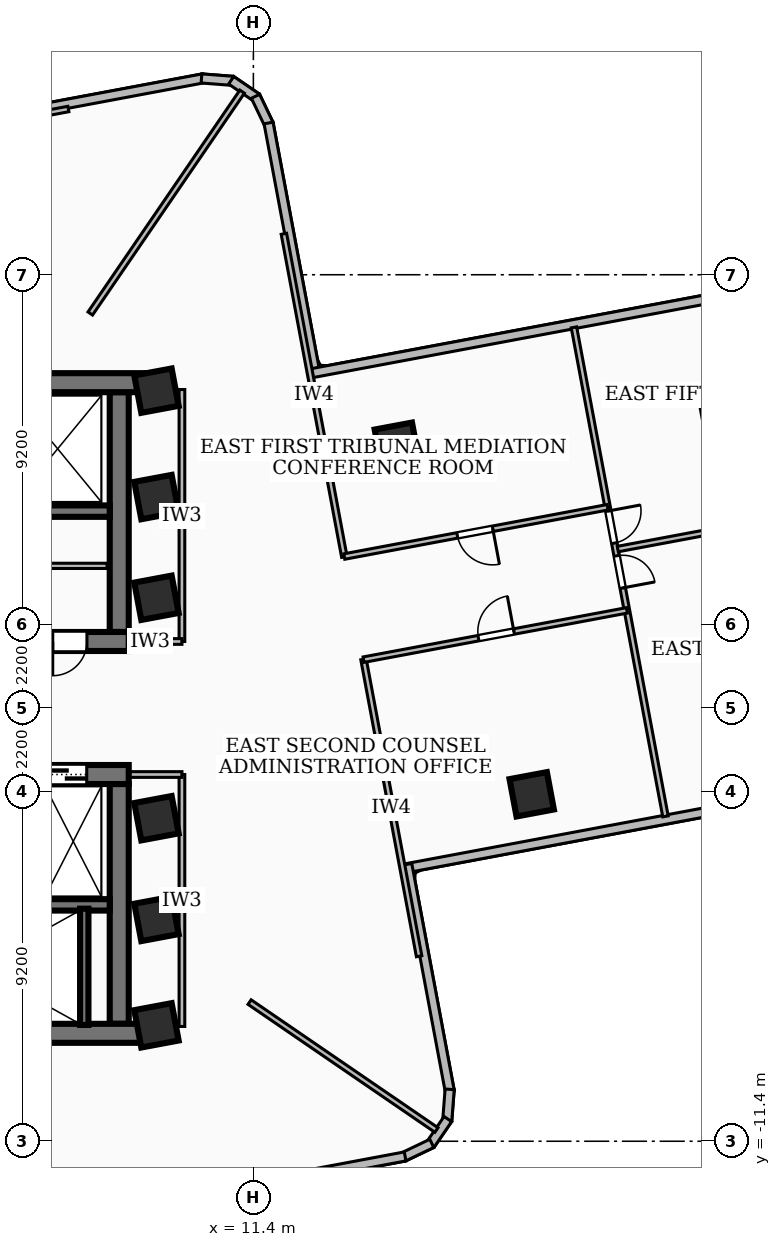
"""IFC4 building model, lengths in metres.
Left out: names, types, materials, properties, quantities, classifications, styles, units other than length and angle.
Written with IfcOpenShell. Run it as: python <this file> out.ifc"""

import sys

from ifc_helpers import new_model, si_unit, direction, frame, frame_2d, origin, origin_2d, place, context, subcontext, project, spatial, rectangle, extrude, element, fill, save


model = new_model("IFC4")
c1 = context("Model", 3, precision=1e-05, world=origin(), true_north=direction((0.0, 1.0)))
c2 = subcontext(c1, "Body", "Model", "MODEL_VIEW")
j1 = project(units=[si_unit("LENGTHUNIT", "METRE"), si_unit("PLANEANGLEUNIT", "RADIAN")], contexts=[c1])
p1 = place(None, origin())
s1 = spatial("IfcSite", under=j1, at=p1, CompositionType="ELEMENT")
p2 = place(p1, origin())
s2 = spatial("IfcBuilding", under=s1, at=p2, CompositionType="ELEMENT")
p3 = place(p2, frame((0.0, 0.0, 103.68)))
s3 = spatial("IfcBuildingStorey", under=s2, at=p3, CompositionType="ELEMENT", Elevation=103.68)
p4 = place(p3, frame((-8.78, 8.56, 0.0), z_axis=(0.0, 0.0, 1.0), x_axis=(1.0, 0.0, 0.0)))
e1 = element("IfcWall", 1, at=p4, inside=s3, PredefinedType="SHEAR", context=c2, shape_type="SweptSolid", body=[
    extrude(rectangle(XDim=17.56, YDim=0.5, at=frame_2d((8.78, 0.0))), origin(), (0.0, 0.0, 1.0), 3.2),
])
p5 = place(p3, frame((8.12, 1.75, 0.0), z_axis=(0.0, 0.0, 1.0), x_axis=(-1.0, 0.0, 0.0)))
e2 = element("IfcWall", 2, at=p5, inside=s3, PredefinedType="SHEAR", context=c2, shape_type="SweptSolid", body=[
    extrude(rectangle(XDim=16.24, YDim=0.5, at=frame_2d((8.12, 0.0))), origin(), (0.0, 0.0, 1.0), 3.2),
])
p6 = place(p5, frame((7.45, 0.0, 0.0)))
e3 = element("IfcOpeningElement", 3, at=p6, cuts=e2, PredefinedType="OPENING", context=c2, shape_type="SweptSolid", body=[
    extrude(rectangle(XDim=1.0, YDim=2.1, at=frame_2d((0.5, 1.05))), frame((0.0, 0.26, 0.0), z_axis=(0.0, -1.0, 0.0), x_axis=(1.0, 0.0, 0.0)), (0.0, 0.0, 1.0), 0.52),
])
p7 = place(p5, frame((3.4, 0.0, 0.0)))
e4 = element("IfcOpeningElement", 4, at=p7, cuts=e2, PredefinedType="OPENING", context=c2, shape_type="SweptSolid", body=[
    extrude(rectangle(XDim=0.9, YDim=2.06, at=frame_2d((0.45, 1.03))), frame((0.0, 0.26, 0.0), z_axis=(0.0, -1.0, 0.0), x_axis=(1.0, 0.0, 0.0)), (0.0, 0.0, 1.0), 0.52),
])
p8 = place(p5, frame((1.1, 0.0, 0.0)))
e5 = element("IfcOpeningElement", 5, at=p8, cuts=e2, PredefinedType="OPENING", context=c2, shape_type="SweptSolid", body=[
    extrude(rectangle(XDim=0.9, YDim=2.06, at=frame_2d((0.45, 1.03))), frame((0.0, 0.26, 0.0), z_axis=(0.0, -1.0, 0.0), x_axis=(1.0, 0.0, 0.0)), (0.0, 0.0, 1.0), 0.52),
])
p9 = place(p3, frame((7.87, 8.31, 0.0), z_axis=(0.0, 0.0, 1.0), x_axis=(0.0, -1.0, 0.0)))
e6 = element("IfcWall", 6, at=p9, inside=s3, PredefinedType="SHEAR", context=c2, shape_type="SweptSolid", body=[
    extrude(rectangle(XDim=6.31, YDim=0.5, at=frame_2d((3.155, 0.0))), origin(), (0.0, 0.0, 1.0), 3.2),
])
p10 = place(p3, frame((7.62, 5.18, 0.0), z_axis=(0.0, 0.0, 1.0), x_axis=(-1.0, 0.0, 0.0)))
e7 = element("IfcWall", 7, at=p10, inside=s3, PredefinedType="SOLIDWALL", context=c2, shape_type="SweptSolid", body=[
    extrude(rectangle(XDim=15.24, YDim=0.3, at=frame_2d((7.62, 0.0))), origin(), (0.0, 0.0, 1.0), 3.2),
])
p11 = place(p10, frame((5.77, 0.0, 0.0)))
e8 = element("IfcOpeningElement", 8, at=p11, cuts=e7, PredefinedType="OPENING", context=c2, shape_type="SweptSolid", body=[
    extrude(rectangle(XDim=1.1, YDim=2.15, at=frame_2d((0.55, 1.075))), frame((0.0, 0.16, 0.0), z_axis=(0.0, -1.0, 0.0), x_axis=(1.0, 0.0, 0.0)), (0.0, 0.0, 1.0), 0.32),
])
p12 = place(p10, frame((2.97, 0.0, 0.0)))
e9 = element("IfcOpeningElement", 9, at=p12, cuts=e7, PredefinedType="OPENING", context=c2, shape_type="SweptSolid", body=[
    extrude(rectangle(XDim=1.1, YDim=2.15, at=frame_2d((0.55, 1.075))), frame((0.0, 0.16, 0.0), z_axis=(0.0, -1.0, 0.0), x_axis=(1.0, 0.0, 0.0)), (0.0, 0.0, 1.0), 0.32),
])
p13 = place(p10, frame((7.97, 0.0, 0.0)))
e10 = element("IfcOpeningElement", 10, at=p13, cuts=e7, PredefinedType="OPENING", context=c2, shape_type="SweptSolid", body=[
    extrude(rectangle(XDim=1.0, YDim=2.1, at=frame_2d((0.5, 1.05))), frame((0.0, 0.16, 0.0), z_axis=(0.0, -1.0, 0.0), x_axis=(1.0, 0.0, 0.0)), (0.0, 0.0, 1.0), 0.32),
])
p14 = place(p3, frame((8.78, -8.56, 0.0), z_axis=(0.0, 0.0, 1.0), x_axis=(-1.0, 0.0, 0.0)))
e11 = element("IfcWall", 11, at=p14, inside=s3, PredefinedType="SHEAR", context=c2, shape_type="SweptSolid", body=[
    extrude(rectangle(XDim=17.56, YDim=0.5, at=frame_2d((8.78, 0.0))), origin(), (0.0, 0.0, 1.0), 3.2),
])
p15 = place(p3, frame((-8.12, -1.75, 0.0), z_axis=(0.0, 0.0, 1.0), x_axis=(1.0, 0.0, 0.0)))
e12 = element("IfcWall", 12, at=p15, inside=s3, PredefinedType="SHEAR", context=c2, shape_type="SweptSolid", body=[
    extrude(rectangle(XDim=16.24, YDim=0.5, at=frame_2d((8.12, 0.0))), origin(), (0.0, 0.0, 1.0), 3.2),
])
p16 = place(p15, frame((7.45, 0.0, 0.0)))
e13 = element("IfcOpeningElement", 13, at=p16, cuts=e12, PredefinedType="OPENING", context=c2, shape_type="SweptSolid", body=[
    extrude(rectangle(XDim=1.0, YDim=2.1, at=frame_2d((0.5, 1.05))), frame((0.0, 0.26, 0.0), z_axis=(0.0, -1.0, 0.0), x_axis=(1.0, 0.0, 0.0)), (0.0, 0.0, 1.0), 0.52),
])
p17 = place(p15, frame((10.965, 0.0, 0.0)))
e14 = element("IfcOpeningElement", 14, at=p17, cuts=e12, PredefinedType="OPENING", context=c2, shape_type="SweptSolid", body=[
    extrude(rectangle(XDim=1.05, YDim=2.15, at=frame_2d((0.525, 1.075))), frame((0.0, 0.26, 0.0), z_axis=(0.0, -1.0, 0.0), x_axis=(1.0, 0.0, 0.0)), (0.0, 0.0, 1.0), 0.52),
])
p18 = place(p15, frame((12.525, 0.0, 0.0)))
e15 = element("IfcOpeningElement", 15, at=p18, cuts=e12, PredefinedType="OPENING", context=c2, shape_type="SweptSolid", body=[
    extrude(rectangle(XDim=1.05, YDim=2.15, at=frame_2d((0.525, 1.075))), frame((0.0, 0.26, 0.0), z_axis=(0.0, -1.0, 0.0), x_axis=(1.0, 0.0, 0.0)), (0.0, 0.0, 1.0), 0.52),
])
p19 = place(p15, frame((14.085, 0.0, 0.0)))
e16 = element("IfcOpeningElement", 16, at=p19, cuts=e12, PredefinedType="OPENING", context=c2, shape_type="SweptSolid", body=[
    extrude(rectangle(XDim=1.05, YDim=2.15, at=frame_2d((0.525, 1.075))), frame((0.0, 0.26, 0.0), z_axis=(0.0, -1.0, 0.0), x_axis=(1.0, 0.0, 0.0)), (0.0, 0.0, 1.0), 0.52),
])
p20 = place(p3, frame((7.87, -2.0, 0.0), z_axis=(0.0, 0.0, 1.0), x_axis=(0.0, -1.0, 0.0)))
e17 = element("IfcWall", 17, at=p20, inside=s3, PredefinedType="SHEAR", context=c2, shape_type="SweptSolid", body=[
    extrude(rectangle(XDim=6.31, YDim=0.5, at=frame_2d((3.155, 0.0))), origin(), (0.0, 0.0, 1.0), 3.2),
])
p21 = place(p3, frame((-7.62, -5.18, 0.0), z_axis=(0.0, 0.0, 1.0), x_axis=(1.0, 0.0, 0.0)))
e18 = element("IfcWall", 18, at=p21, inside=s3, PredefinedType="SOLIDWALL", context=c2, shape_type="SweptSolid", body=[
    extrude(rectangle(XDim=15.24, YDim=0.3, at=frame_2d((7.62, 0.0))), origin(), (0.0, 0.0, 1.0), 3.2),
])
p22 = place(p21, frame((5.77, 0.0, 0.0)))
e19 = element("IfcOpeningElement", 19, at=p22, cuts=e18, PredefinedType="OPENING", context=c2, shape_type="SweptSolid", body=[
    extrude(rectangle(XDim=1.1, YDim=2.15, at=frame_2d((0.55, 1.075))), frame((0.0, 0.16, 0.0), z_axis=(0.0, -1.0, 0.0), x_axis=(1.0, 0.0, 0.0)), (0.0, 0.0, 1.0), 0.32),
])
p23 = place(p21, frame((7.97, 0.0, 0.0)))
e20 = element("IfcOpeningElement", 20, at=p23, cuts=e18, PredefinedType="OPENING", context=c2, shape_type="SweptSolid", body=[
    extrude(rectangle(XDim=1.0, YDim=2.1, at=frame_2d((0.5, 1.05))), frame((0.0, 0.16, 0.0), z_axis=(0.0, -1.0, 0.0), x_axis=(1.0, 0.0, 0.0)), (0.0, 0.0, 1.0), 0.32),
])
p24 = place(p3, frame((6.95, -8.34, 0.0), z_axis=(0.0, 0.0, 1.0), x_axis=(0.0, 1.0, 0.0)))
e21 = element("IfcWall", 21, at=p24, inside=s3, PredefinedType="SOLIDWALL", context=c2, shape_type="SweptSolid", body=[
    extrude(rectangle(XDim=3.06, YDim=0.22, at=frame_2d((1.53, 0.0))), origin(), (0.0, 0.0, 1.0), 3.2),
])
for number, where, z_axis, x_axis in (
    (22, (8.85, -5.55, 0.0), (0.0, 0.0, 1.0), (0.983, 0.184, 0.0)),
    (23, (8.85, -2.9, 0.0), (0.0, 0.0, 1.0), (0.983, 0.184, 0.0)),
    (24, (8.85, 2.9, 0.0), (0.0, 0.0, 1.0), (0.983, 0.184, 0.0)),
    (25, (8.85, 5.55, 0.0), (0.0, 0.0, 1.0), (0.983, 0.184, 0.0)),
    (26, (8.85, -8.35, 0.0), (0.0, 0.0, 1.0), (0.983, 0.184, 0.0)),
    (27, (8.85, 8.35, 0.0), (0.0, 0.0, 1.0), (0.983, 0.184, 0.0)),
    (28, (18.724, -2.271, 0.0), (0.0, 0.0, 1.0), (0.983, 0.184, 0.0)),
    (29, (15.175, 6.927, 0.0), (0.0, 0.0, 1.0), (0.983, 0.184, 0.0)),
    (30, (23.715, 7.851, 0.0), (0.0, 0.0, 1.0), (0.983, 0.184, 0.0)),
):
    element("IfcColumn", number, at=place(p3, frame(where, z_axis=z_axis, x_axis=x_axis)), inside=s3, PredefinedType="COLUMN", context=c2, shape_type="SweptSolid", body=[
        extrude(rectangle(XDim=1.0, YDim=1.0, at=origin_2d()), origin(), (0.0, 0.0, 1.0), 3.6),
    ])
p25 = place(p3, frame((4.113, 15.45, 0.0), z_axis=(0.0, 0.0, 1.0), x_axis=(0.982913564854, 0.18406771587, 0.0)))
e31 = element("IfcWall", 31, at=p25, inside=s3, PredefinedType="SOLIDWALL", context=c2, shape_type="SweptSolid", body=[
    extrude(rectangle(XDim=6.075, YDim=0.24, at=frame_2d((3.037, 0.0))), origin(), (0.0, 0.0, 1.0), 2.346),
])
p26 = place(p3, frame((10.034, 16.565, 0.0), z_axis=(0.0, 0.0, 1.0), x_axis=(0.997030229365, -0.077011179273, 0.0)))
e32 = element("IfcWall", 32, at=p26, inside=s3, PredefinedType="SOLIDWALL", context=c2, shape_type="SweptSolid", body=[
    extrude(rectangle(XDim=0.831, YDim=0.24, at=frame_2d((0.415, 0.0))), origin(), (0.0, 0.0, 1.0), 3.2),
])
p27 = place(p3, frame((10.816, 16.517, 0.0), z_axis=(0.0, 0.0, 1.0), x_axis=(0.825814611055, -0.563941688624, 0.0)))
e33 = element("IfcWall", 33, at=p27, inside=s3, PredefinedType="SOLIDWALL", context=c2, shape_type="SweptSolid", body=[
    extrude(rectangle(XDim=0.814, YDim=0.24, at=frame_2d((0.407, 0.0))), origin(), (0.0, 0.0, 1.0), 3.2),
])
p28 = place(p3, frame((11.456, 16.095, 0.0), z_axis=(0.0, 0.0, 1.0), x_axis=(0.431642510533, -0.902044756706, 0.0)))
e34 = element("IfcWall", 34, at=p28, inside=s3, PredefinedType="SOLIDWALL", context=c2, shape_type="SweptSolid", body=[
    extrude(rectangle(XDim=0.832, YDim=0.24, at=frame_2d((0.416, 0.0))), origin(), (0.0, 0.0, 1.0), 3.2),
])
p29 = place(p3, frame((11.799, 15.393, 0.0), z_axis=(0.0, 0.0, 1.0), x_axis=(0.184184115697, -0.982891759821, 0.0)))
e35 = element("IfcWall", 35, at=p29, inside=s3, PredefinedType="SOLIDWALL", context=c2, shape_type="SweptSolid", body=[
    extrude(rectangle(XDim=6.776, YDim=0.24, at=frame_2d((3.388, 0.0))), origin(), (0.0, 0.0, 1.0), 3.2),
])
p30 = place(p3, frame((12.935, 8.809, 0.0), z_axis=(0.0, 0.0, 1.0), x_axis=(0.982922588066, 0.184019525782, 0.0)))
e36 = element("IfcWall", 36, at=p30, inside=s3, PredefinedType="SOLIDWALL", context=c2, shape_type="SweptSolid", body=[
    extrude(rectangle(XDim=16.275, YDim=0.24, at=frame_2d((8.137, 0.0))), origin(), (0.0, 0.0, 1.0), 3.2),
])
p31 = place(p30, frame((12.475, 0.0, 0.85)))
e37 = element("IfcOpeningElement", 37, at=p31, cuts=e36, PredefinedType="OPENING", context=c2, shape_type="SweptSolid", body=[
    extrude(rectangle(XDim=2.7, YDim=1.65, at=frame_2d((1.35, 0.825))), frame((0.0, 0.13, 0.0), z_axis=(0.0, -1.0, 0.0), x_axis=(1.0, 0.0, 0.0)), (0.0, 0.0, 1.0), 0.26),
])
p32 = place(p3, frame((31.371, -1.23, 0.0), z_axis=(0.0, 0.0, 1.0), x_axis=(-0.982920382654, -0.18403130539, 0.0)))
e38 = element("IfcWall", 38, at=p32, inside=s3, PredefinedType="SOLIDWALL", context=c2, shape_type="SweptSolid", body=[
    extrude(rectangle(XDim=16.275, YDim=0.24, at=frame_2d((8.138, 0.0))), origin(), (0.0, 0.0, 1.0), 3.2),
])
p33 = place(p32, frame((1.1, 0.0, 0.85)))
e39 = element("IfcOpeningElement", 39, at=p33, cuts=e38, PredefinedType="OPENING", context=c2, shape_type="SweptSolid", body=[
    extrude(rectangle(XDim=2.1, YDim=2.0, at=frame_2d((1.05, 1.0))), frame((0.0, 0.13, 0.0), z_axis=(0.0, -1.0, 0.0), x_axis=(1.0, 0.0, 0.0)), (0.0, 0.0, 1.0), 0.26),
])
p34 = place(p3, frame((15.45, -4.113, 0.0), z_axis=(0.0, 0.0, 1.0), x_axis=(0.18406771587, -0.982913564854, 0.0)))
e40 = element("IfcWall", 40, at=p34, inside=s3, PredefinedType="SOLIDWALL", context=c2, shape_type="SweptSolid", body=[
    extrude(rectangle(XDim=6.075, YDim=0.24, at=frame_2d((3.037, 0.0))), origin(), (0.0, 0.0, 1.0), 3.2),
])
p35 = place(p3, frame((16.565, -10.034, 0.0), z_axis=(0.0, 0.0, 1.0), x_axis=(-0.077011179273, -0.997030229365, 0.0)))
e41 = element("IfcWall", 41, at=p35, inside=s3, PredefinedType="SOLIDWALL", context=c2, shape_type="SweptSolid", body=[
    extrude(rectangle(XDim=0.831, YDim=0.24, at=frame_2d((0.415, 0.0))), origin(), (0.0, 0.0, 1.0), 3.2),
])
p36 = place(p3, frame((16.517, -10.816, 0.0), z_axis=(0.0, 0.0, 1.0), x_axis=(-0.563941688624, -0.825814611055, 0.0)))
e42 = element("IfcWall", 42, at=p36, inside=s3, PredefinedType="SOLIDWALL", context=c2, shape_type="SweptSolid", body=[
    extrude(rectangle(XDim=0.814, YDim=0.24, at=frame_2d((0.407, 0.0))), origin(), (0.0, 0.0, 1.0), 3.2),
])
p37 = place(p3, frame((16.095, -11.456, 0.0), z_axis=(0.0, 0.0, 1.0), x_axis=(-0.902044756706, -0.431642510533, 0.0)))
e43 = element("IfcWall", 43, at=p37, inside=s3, PredefinedType="SOLIDWALL", context=c2, shape_type="SweptSolid", body=[
    extrude(rectangle(XDim=0.832, YDim=0.24, at=frame_2d((0.416, 0.0))), origin(), (0.0, 0.0, 1.0), 3.2),
])
p38 = place(p3, frame((15.393, -11.799, 0.0), z_axis=(0.0, 0.0, 1.0), x_axis=(-0.982891759821, -0.184184115697, 0.0)))
e44 = element("IfcWall", 44, at=p38, inside=s3, PredefinedType="SOLIDWALL", context=c2, shape_type="SweptSolid", body=[
    extrude(rectangle(XDim=6.776, YDim=0.24, at=frame_2d((3.388, 0.0))), origin(), (0.0, 0.0, 1.0), 3.2),
])
p39 = place(p3, frame((2.9, 3.74, 0.0), z_axis=(0.0, 0.0, 1.0), x_axis=(1.0, 0.0, 0.0)))
e45 = element("IfcWall", 45, at=p39, inside=s3, PredefinedType="PARTITIONING", context=c2, shape_type="SweptSolid", body=[
    extrude(rectangle(XDim=4.65, YDim=0.138, at=frame_2d((2.325, 0.0))), origin(), (0.0, 0.0, 1.0), 3.2),
])
p40 = place(p3, frame((9.52, 1.75, 0.0), z_axis=(0.0, 0.0, 1.0), x_axis=(0.0, 1.0, 0.0)))
e46 = element("IfcWall", 46, at=p40, inside=s3, PredefinedType="PARTITIONING", context=c2, shape_type="SweptSolid", body=[
    extrude(rectangle(XDim=6.63, YDim=0.15, at=frame_2d((3.315, 0.0))), origin(), (0.0, 0.0, 1.0), 2.346),
])
p41 = place(p3, frame((7.85, 1.75, 0.0), z_axis=(0.0, 0.0, 1.0), x_axis=(1.0, 0.0, 0.0)))
e47 = element("IfcWall", 47, at=p41, inside=s3, PredefinedType="PARTITIONING", context=c2, shape_type="SweptSolid", body=[
    extrude(rectangle(XDim=1.67, YDim=0.15, at=frame_2d((0.835, 0.0))), origin(), (0.0, 0.0, 1.0), 2.265),
])
p42 = place(p3, frame((9.52, -8.38, 0.0), z_axis=(0.0, 0.0, 1.0), x_axis=(0.0, 1.0, 0.0)))
e48 = element("IfcWall", 48, at=p42, inside=s3, PredefinedType="PARTITIONING", context=c2, shape_type="SweptSolid", body=[
    extrude(rectangle(XDim=6.63, YDim=0.15, at=frame_2d((3.315, 0.0))), origin(), (0.0, 0.0, 1.0), 2.346),
])
p43 = place(p3, frame((7.85, -1.75, 0.0), z_axis=(0.0, 0.0, 1.0), x_axis=(1.0, 0.0, 0.0)))
e49 = element("IfcWall", 49, at=p43, inside=s3, PredefinedType="PARTITIONING", context=c2, shape_type="SweptSolid", body=[
    extrude(rectangle(XDim=1.67, YDim=0.15, at=frame_2d((0.835, 0.0))), origin(), (0.0, 0.0, 1.0), 2.265),
])
p44 = place(p3, frame((7.108, 10.38, 0.0), z_axis=(0.0, 0.0, 1.0), x_axis=(0.564900413187, 0.825159089619, 0.0)))
e50 = element("IfcWall", 50, at=p44, inside=s3, PredefinedType="PARTITIONING", context=c2, shape_type="SweptSolid", body=[
    extrude(rectangle(XDim=7.074, YDim=0.145, at=frame_2d((3.537, 0.0))), origin(), (0.0, 0.0, 1.0), 2.346),
])
p45 = place(p3, frame((11.3, -7.738, 0.0), z_axis=(0.0, 0.0, 1.0), x_axis=(0.825173577049, -0.564879250584, 0.0)))
e51 = element("IfcWall", 51, at=p45, inside=s3, PredefinedType="PARTITIONING", context=c2, shape_type="SweptSolid", body=[
    extrude(rectangle(XDim=5.959, YDim=0.145, at=frame_2d((2.979, 0.0))), origin(), (0.0, 0.0, 1.0), 3.2),
])
p46 = place(p3, frame((13.794, 3.975, 0.0), z_axis=(0.0, 0.0, 1.0), x_axis=(-0.183947683851, 0.982936035358, 0.0)))
e52 = element("IfcWall", 52, at=p46, inside=s3, PredefinedType="PARTITIONING", context=c2, shape_type="SweptSolid", body=[
    extrude(rectangle(XDim=8.65, YDim=0.145, at=frame_2d((4.325, 0.0))), origin(), (0.0, 0.0, 1.0), 2.346),
])
p47 = place(p3, frame((15.761, -6.532, 0.0), z_axis=(0.0, 0.0, 1.0), x_axis=(-0.184017811376, 0.98292290903, 0.0)))
e53 = element("IfcWall", 53, at=p47, inside=s3, PredefinedType="PARTITIONING", context=c2, shape_type="SweptSolid", body=[
    extrude(rectangle(XDim=7.95, YDim=0.145, at=frame_2d((3.975, 0.0))), origin(), (0.0, 0.0, 1.0), 2.346),
])
p48 = place(p3, frame((20.722, 5.282, 0.0), z_axis=(0.0, 0.0, 1.0), x_axis=(-0.982936027627, -0.183947725163, 0.0)))
e54 = element("IfcWall", 54, at=p48, inside=s3, PredefinedType="PARTITIONING", context=c2, shape_type="SweptSolid", body=[
    extrude(rectangle(XDim=7.05, YDim=0.145, at=frame_2d((3.525, 0.0))), origin(), (0.0, 0.0, 1.0), 3.2),
])
p49 = place(p48, frame((3.075, 0.0, 0.0)))
e55 = element("IfcOpeningElement", 55, at=p49, cuts=e54, PredefinedType="OPENING", context=c2, shape_type="SweptSolid", body=[
    extrude(rectangle(XDim=0.95, YDim=2.08, at=frame_2d((0.475, 1.04))), frame((0.0, 0.083, 0.0), z_axis=(0.0, -1.0, 0.0), x_axis=(1.0, 0.0, 0.0)), (0.0, 0.0, 1.0), 0.165),
])
p50 = place(p3, frame((14.3, 1.272, 0.0), z_axis=(0.0, 0.0, 1.0), x_axis=(0.98292976592, 0.183981181833, 0.0)))
e56 = element("IfcWall", 56, at=p50, inside=s3, PredefinedType="PARTITIONING", context=c2, shape_type="SweptSolid", body=[
    extrude(rectangle(XDim=7.05, YDim=0.145, at=frame_2d((3.525, 0.0))), origin(), (0.0, 0.0, 1.0), 3.2),
])
p51 = place(p50, frame((3.075, 0.0, 0.0)))
e57 = element("IfcOpeningElement", 57, at=p51, cuts=e56, PredefinedType="OPENING", context=c2, shape_type="SweptSolid", body=[
    extrude(rectangle(XDim=0.95, YDim=2.08, at=frame_2d((0.475, 1.04))), frame((0.0, 0.083, 0.0), z_axis=(0.0, -1.0, 0.0), x_axis=(1.0, 0.0, 0.0)), (0.0, 0.0, 1.0), 0.165),
])
p52 = place(p3, frame((20.989, 4.182, 0.0), z_axis=(0.0, 0.0, 1.0), x_axis=(0.982930571593, 0.183976877429, 0.0)))
e58 = element("IfcWall", 58, at=p52, inside=s3, PredefinedType="PARTITIONING", context=c2, shape_type="SweptSolid", body=[
    extrude(rectangle(XDim=10.595, YDim=0.145, at=frame_2d((5.297, 0.0))), origin(), (0.0, 0.0, 1.0), 2.692),
])
p53 = place(p3, frame((19.836, 10.015, 0.0), z_axis=(0.0, 0.0, 1.0), x_axis=(0.183949578206, -0.982935680845, 0.0)))
e59 = element("IfcWall", 59, at=p53, inside=s3, PredefinedType="PARTITIONING", context=c2, shape_type="SweptSolid", body=[
    extrude(rectangle(XDim=13.09, YDim=0.145, at=frame_2d((6.545, 0.0))), origin(), (0.0, 0.0, 1.0), 2.346),
])
p54 = place(p53, frame((6.115, 0.0, 0.0)))
e60 = element("IfcOpeningElement", 60, at=p54, cuts=e59, PredefinedType="OPENING", context=c2, shape_type="SweptSolid", body=[
    extrude(rectangle(XDim=0.86, YDim=2.04, at=frame_2d((0.43, 1.02))), frame((0.0, 0.083, 0.0), z_axis=(0.0, -1.0, 0.0), x_axis=(1.0, 0.0, 0.0)), (0.0, 0.0, 1.0), 0.165),
])
p55 = place(p53, frame((4.915, 0.0, 0.0)))
e61 = element("IfcOpeningElement", 61, at=p55, cuts=e59, PredefinedType="OPENING", context=c2, shape_type="SweptSolid", body=[
    extrude(rectangle(XDim=0.86, YDim=2.04, at=frame_2d((0.43, 1.02))), frame((0.0, 0.083, 0.0), z_axis=(0.0, -1.0, 0.0), x_axis=(1.0, 0.0, 0.0)), (0.0, 0.0, 1.0), 0.165),
])
p56 = place(p3, frame((6.532, 15.761, 0.0), z_axis=(0.0, 0.0, 1.0), x_axis=(-0.98292290903, -0.184017811376, 0.0)))
e62 = element("IfcWall", 62, at=p56, inside=s3, PredefinedType="PARTITIONING", context=c2, shape_type="SweptSolid", body=[
    extrude(rectangle(XDim=7.95, YDim=0.145, at=frame_2d((3.975, 0.0))), origin(), (0.0, 0.0, 1.0), 2.346),
])
p57 = place(p19, origin())
e63 = element("IfcDoor", 63, at=p57, inside=s3, OperationType="DOUBLE_DOOR_SLIDING", PredefinedType="DOOR", context=c2, shape_type="SweptSolid", body=[
    extrude(rectangle(XDim=1.05, YDim=2.15, at=frame_2d((0.525, 1.075))), frame((0.0, 0.025, 0.0), z_axis=(0.0, -1.0, 0.0), x_axis=(1.0, 0.0, 0.0)), (0.0, 0.0, 1.0), 0.05),
])
fill(e16, e63)
p58 = place(p8, origin())
e64 = element("IfcDoor", 64, at=p58, inside=s3, OperationType="SINGLE_SWING_RIGHT", PredefinedType="DOOR", context=c2, shape_type="SweptSolid", body=[
    extrude(rectangle(XDim=0.9, YDim=2.06, at=frame_2d((0.45, 1.03))), frame((0.0, 0.025, 0.0), z_axis=(0.0, -1.0, 0.0), x_axis=(1.0, 0.0, 0.0)), (0.0, 0.0, 1.0), 0.05),
])
fill(e5, e64)
p59 = place(p49, origin())
e65 = element("IfcDoor", 65, at=p59, inside=s3, OperationType="SINGLE_SWING_LEFT", PredefinedType="DOOR", context=c2, shape_type="SweptSolid", body=[
    extrude(rectangle(XDim=0.95, YDim=2.08, at=frame_2d((0.475, 1.04))), frame((0.0, 0.025, 0.0), z_axis=(0.0, -1.0, 0.0), x_axis=(1.0, 0.0, 0.0)), (0.0, 0.0, 1.0), 0.05),
])
fill(e55, e65)
p60 = place(p51, origin())
e66 = element("IfcDoor", 66, at=p60, inside=s3, OperationType="SINGLE_SWING_RIGHT", PredefinedType="DOOR", context=c2, shape_type="SweptSolid", body=[
    extrude(rectangle(XDim=0.95, YDim=2.08, at=frame_2d((0.475, 1.04))), frame((0.0, 0.025, 0.0), z_axis=(0.0, -1.0, 0.0), x_axis=(1.0, 0.0, 0.0)), (0.0, 0.0, 1.0), 0.05),
])
fill(e57, e66)
p61 = place(p54, origin())
e67 = element("IfcDoor", 67, at=p61, inside=s3, OperationType="SINGLE_SWING_RIGHT", PredefinedType="DOOR", context=c2, shape_type="SweptSolid", body=[
    extrude(rectangle(XDim=0.86, YDim=2.04, at=frame_2d((0.43, 1.02))), frame((0.0, 0.025, 0.0), z_axis=(0.0, -1.0, 0.0), x_axis=(1.0, 0.0, 0.0)), (0.0, 0.0, 1.0), 0.05),
])
fill(e60, e67)
p62 = place(p55, origin())
e68 = element("IfcDoor", 68, at=p62, inside=s3, OperationType="SINGLE_SWING_LEFT", PredefinedType="DOOR", context=c2, shape_type="SweptSolid", body=[
    extrude(rectangle(XDim=0.86, YDim=2.04, at=frame_2d((0.43, 1.02))), frame((0.0, 0.025, 0.0), z_axis=(0.0, -1.0, 0.0), x_axis=(1.0, 0.0, 0.0)), (0.0, 0.0, 1.0), 0.05),
])
fill(e61, e68)
save(model, sys.argv[1])
